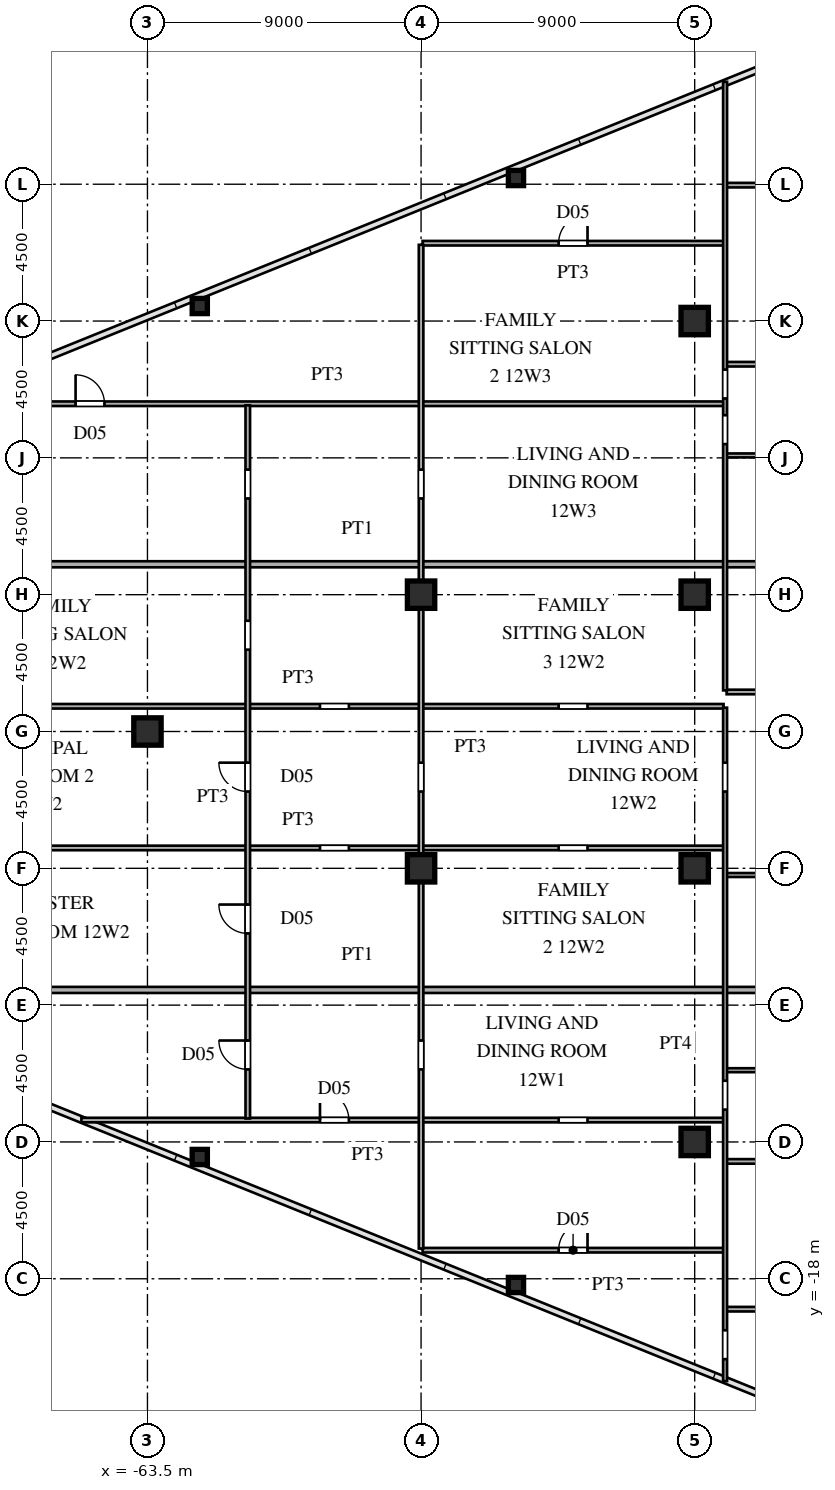
"""IFC4 building model, lengths in metres.
Left out: names, types, materials, properties, quantities, classifications, styles, units other than length and angle.
Written with IfcOpenShell. Run it as: python <this file> out.ifc"""

import sys

from ifc_helpers import new_model, si_unit, direction, frame, frame_2d, origin, origin_2d, place, context, subcontext, project, spatial, rectangle, hollow_rectangle, i_section, extrude, source, transform, mapped, element, fill, save


model = new_model("IFC4")
c1 = context("Model", 3, precision=1e-05, world=origin(), true_north=direction((0.0, 1.0)))
c2 = subcontext(c1, "Body", "Model", "MODEL_VIEW")
j1 = project(units=[si_unit("LENGTHUNIT", "METRE"), si_unit("PLANEANGLEUNIT", "RADIAN")], contexts=[c1])
p1 = place(None, origin())
s1 = spatial("IfcSite", under=j1, at=p1, CompositionType="ELEMENT")
p2 = place(p1, origin())
s2 = spatial("IfcBuilding", under=s1, at=p2, CompositionType="ELEMENT")
p3 = place(p2, frame((0.0, 0.0, 47.7)))
s3 = spatial("IfcBuildingStorey", under=s2, at=p3, CompositionType="ELEMENT", Elevation=47.7)
m1 = source(origin(), c2, "Body", "SweptSolid", [
    extrude(i_section(OverallWidth=0.9, OverallDepth=0.9, WebThickness=0.036, FlangeThickness=0.055, at=origin_2d()), origin(), (0.0, 0.0, 1.0), 3.6),
])
for number, where, z_axis, x_axis in (
    (1, (-45.5, -13.5, 0.0), (0.0, 0.0, 1.0), (1.0, 0.0, 0.0)),
    (2, (-45.5, -4.5, 0.0), (0.0, 0.0, 1.0), (1.0, 0.0, 0.0)),
    (3, (-45.5, 4.5, 0.0), (0.0, 0.0, 1.0), (1.0, 0.0, 0.0)),
    (4, (-45.5, 13.5, 0.0), (0.0, 0.0, 1.0), (1.0, 0.0, 0.0)),
    (5, (-54.5, -4.5, 0.0), (0.0, 0.0, 1.0), (1.0, 0.0, 0.0)),
    (6, (-54.5, 4.5, 0.0), (0.0, 0.0, 1.0), (1.0, 0.0, 0.0)),
    (7, (-63.5, 0.0, 0.0), (0.0, 0.0, 1.0), (1.0, 0.0, 0.0)),
):
    element("IfcColumn", number, at=place(p3, frame(where, z_axis=z_axis, x_axis=x_axis)), inside=s3, PredefinedType="COLUMN", context=c2, shape_type="MappedRepresentation", body=[
        mapped(m1, transform((0.0, 0.0, 0.0), scale=1.0)),
    ])
m2 = source(origin(), c2, "Body", "SweptSolid", [
    extrude(hollow_rectangle(XDim=0.5, YDim=0.5, WallThickness=0.02, at=origin_2d()), origin(), (0.0, 0.0, 1.0), 3.6),
])
for number, where, z_axis, x_axis in (
    (8, (-51.378, -18.204, 0.0), (0.0, 0.0, 1.0), (1.0, 0.0, 0.0)),
    (9, (-61.779, -13.994, 0.0), (0.0, 0.0, 1.0), (1.0, 0.0, 0.0)),
    (10, (-51.378, 18.204, 0.0), (0.0, 0.0, 1.0), (1.0, 0.0, 0.0)),
    (11, (-61.779, 13.994, 0.0), (0.0, 0.0, 1.0), (1.0, 0.0, 0.0)),
):
    element("IfcColumn", number, at=place(p3, frame(where, z_axis=z_axis, x_axis=x_axis)), inside=s3, PredefinedType="COLUMN", context=c2, shape_type="MappedRepresentation", body=[
        mapped(m2, transform((0.0, 0.0, 0.0), scale=1.0)),
    ])
p4 = place(p3, frame((-44.45, -19.0, 0.0), z_axis=(0.0, 0.0, 1.0), x_axis=(1.0, 0.0, 0.0)))
e12 = element("IfcWall", 12, at=p4, inside=s3, PredefinedType="PARTITIONING", context=c2, shape_type="SweptSolid", body=[
    extrude(rectangle(XDim=6.15, YDim=0.15, at=frame_2d((3.075, 0.0))), origin(), (0.0, 0.0, 1.0), 3.38),
])
p5 = place(p3, frame((-54.45, -17.06, 0.0), z_axis=(0.0, 0.0, 1.0), x_axis=(1.0, 0.0, 0.0)))
e13 = element("IfcWall", 13, at=p5, inside=s3, PredefinedType="PARTITIONING", context=c2, shape_type="SweptSolid", body=[
    extrude(rectangle(XDim=9.9, YDim=0.15, at=frame_2d((4.95, 0.0))), origin(), (0.0, 0.0, 1.0), 3.38),
])
p6 = place(p5, frame((4.475, 0.0, 0.0)))
e14 = element("IfcOpeningElement", 14, at=p6, cuts=e13, PredefinedType="OPENING", context=c2, shape_type="SweptSolid", body=[
    extrude(rectangle(XDim=0.95, YDim=2.15, at=frame_2d((0.475, 1.075))), frame((0.0, 0.085, 0.0), z_axis=(0.0, -1.0, 0.0), x_axis=(1.0, 0.0, 0.0)), (0.0, 0.0, 1.0), 0.17),
])
p7 = place(p3, frame((-44.45, -14.14, 0.0), z_axis=(0.0, 0.0, 1.0), x_axis=(1.0, 0.0, 0.0)))
e15 = element("IfcWall", 15, at=p7, inside=s3, PredefinedType="PARTITIONING", context=c2, shape_type="SweptSolid", body=[
    extrude(rectangle(XDim=6.1, YDim=0.15, at=frame_2d((3.05, 0.0))), origin(), (0.0, 0.0, 1.0), 3.38),
])
p8 = place(p7, frame((2.575, 0.0, 0.0)))
e16 = element("IfcOpeningElement", 16, at=p8, cuts=e15, PredefinedType="OPENING", context=c2, shape_type="SweptSolid", body=[
    extrude(rectangle(XDim=0.95, YDim=2.15, at=frame_2d((0.475, 1.075))), frame((0.0, 0.085, 0.0), z_axis=(0.0, -1.0, 0.0), x_axis=(1.0, 0.0, 0.0)), (0.0, 0.0, 1.0), 0.17),
])
p9 = place(p3, frame((-65.672, -12.78, 0.0), z_axis=(0.0, 0.0, 1.0), x_axis=(1.0, 0.0, 0.0)))
e17 = element("IfcWall", 17, at=p9, inside=s3, PredefinedType="PARTITIONING", context=c2, shape_type="SweptSolid", body=[
    extrude(rectangle(XDim=21.122, YDim=0.15, at=frame_2d((10.561, 0.0))), origin(), (0.0, 0.0, 1.0), 3.38),
])
p10 = place(p9, frame((15.697, 0.0, 0.0)))
e18 = element("IfcOpeningElement", 18, at=p10, cuts=e17, PredefinedType="OPENING", context=c2, shape_type="SweptSolid", body=[
    extrude(rectangle(XDim=0.95, YDim=2.15, at=frame_2d((0.475, 1.075))), frame((0.0, 0.085, 0.0), z_axis=(0.0, -1.0, 0.0), x_axis=(1.0, 0.0, 0.0)), (0.0, 0.0, 1.0), 0.17),
])
p11 = place(p9, frame((7.847, 0.0, 0.0)))
e19 = element("IfcOpeningElement", 19, at=p11, cuts=e17, PredefinedType="OPENING", context=c2, shape_type="SweptSolid", body=[
    extrude(rectangle(XDim=0.95, YDim=2.15, at=frame_2d((0.475, 1.075))), frame((0.0, 0.085, 0.0), z_axis=(0.0, -1.0, 0.0), x_axis=(1.0, 0.0, 0.0)), (0.0, 0.0, 1.0), 0.17),
])
p12 = place(p3, frame((-44.45, -11.14, 0.0), z_axis=(0.0, 0.0, 1.0), x_axis=(1.0, 0.0, 0.0)))
e20 = element("IfcWall", 20, at=p12, inside=s3, PredefinedType="PARTITIONING", context=c2, shape_type="SweptSolid", body=[
    extrude(rectangle(XDim=6.1, YDim=0.13, at=frame_2d((3.05, 0.0))), origin(), (0.0, 0.0, 1.0), 3.38),
])
p13 = place(p12, frame((2.61, 0.0, 0.0)))
e21 = element("IfcOpeningElement", 21, at=p13, cuts=e20, PredefinedType="OPENING", context=c2, shape_type="SweptSolid", body=[
    extrude(rectangle(XDim=0.88, YDim=2.1, at=frame_2d((0.44, 1.05))), frame((0.0, 0.075, 0.0), z_axis=(0.0, -1.0, 0.0), x_axis=(1.0, 0.0, 0.0)), (0.0, 0.0, 1.0), 0.15),
])
p14 = place(p3, frame((-72.505, -8.5, 0.0), z_axis=(0.0, 0.0, 1.0), x_axis=(1.0, 0.0, 0.0)))
e22 = element("IfcWall", 22, at=p14, inside=s3, PredefinedType="PARTITIONING", context=c2, shape_type="SweptSolid", body=[
    extrude(rectangle(XDim=34.125, YDim=0.2, at=frame_2d((17.062, 0.0))), origin(), (0.0, 0.0, 1.0), 3.38),
])
p15 = place(p3, frame((-44.45, -4.72, 0.0), z_axis=(0.0, 0.0, 1.0), x_axis=(1.0, 0.0, 0.0)))
e23 = element("IfcWall", 23, at=p15, inside=s3, PredefinedType="PARTITIONING", context=c2, shape_type="SweptSolid", body=[
    extrude(rectangle(XDim=6.1, YDim=0.13, at=frame_2d((3.05, 0.0))), origin(), (0.0, 0.0, 1.0), 3.38),
])
p16 = place(p15, frame((2.61, 0.0, 0.0)))
e24 = element("IfcOpeningElement", 24, at=p16, cuts=e23, PredefinedType="OPENING", context=c2, shape_type="SweptSolid", body=[
    extrude(rectangle(XDim=0.88, YDim=2.1, at=frame_2d((0.44, 1.05))), frame((0.0, 0.075, 0.0), z_axis=(0.0, -1.0, 0.0), x_axis=(1.0, 0.0, 0.0)), (0.0, 0.0, 1.0), 0.15),
])
p17 = place(p3, frame((-72.535, -3.83, 0.0), z_axis=(0.0, 0.0, 1.0), x_axis=(1.0, 0.0, 0.0)))
e25 = element("IfcWall", 25, at=p17, inside=s3, PredefinedType="PARTITIONING", context=c2, shape_type="SweptSolid", body=[
    extrude(rectangle(XDim=27.985, YDim=0.15, at=frame_2d((13.992, 0.0))), origin(), (0.0, 0.0, 1.0), 3.38),
])
p18 = place(p17, frame((22.56, 0.0, 0.0)))
e26 = element("IfcOpeningElement", 26, at=p18, cuts=e25, PredefinedType="OPENING", context=c2, shape_type="SweptSolid", body=[
    extrude(rectangle(XDim=0.95, YDim=2.15, at=frame_2d((0.475, 1.075))), frame((0.0, 0.085, 0.0), z_axis=(0.0, -1.0, 0.0), x_axis=(1.0, 0.0, 0.0)), (0.0, 0.0, 1.0), 0.17),
])
p19 = place(p17, frame((14.71, 0.0, 0.0)))
e27 = element("IfcOpeningElement", 27, at=p19, cuts=e25, PredefinedType="OPENING", context=c2, shape_type="SweptSolid", body=[
    extrude(rectangle(XDim=0.95, YDim=2.15, at=frame_2d((0.475, 1.075))), frame((0.0, 0.085, 0.0), z_axis=(0.0, -1.0, 0.0), x_axis=(1.0, 0.0, 0.0)), (0.0, 0.0, 1.0), 0.17),
])
p20 = place(p3, frame((-72.535, 0.83, 0.0), z_axis=(0.0, 0.0, 1.0), x_axis=(1.0, 0.0, 0.0)))
e28 = element("IfcWall", 28, at=p20, inside=s3, PredefinedType="PARTITIONING", context=c2, shape_type="SweptSolid", body=[
    extrude(rectangle(XDim=27.985, YDim=0.15, at=frame_2d((13.992, 0.0))), origin(), (0.0, 0.0, 1.0), 3.38),
])
p21 = place(p20, frame((22.56, 0.0, 0.0)))
e29 = element("IfcOpeningElement", 29, at=p21, cuts=e28, PredefinedType="OPENING", context=c2, shape_type="SweptSolid", body=[
    extrude(rectangle(XDim=0.95, YDim=2.15, at=frame_2d((0.475, 1.075))), frame((0.0, 0.085, 0.0), z_axis=(0.0, -1.0, 0.0), x_axis=(1.0, 0.0, 0.0)), (0.0, 0.0, 1.0), 0.17),
])
p22 = place(p20, frame((14.71, 0.0, 0.0)))
e30 = element("IfcOpeningElement", 30, at=p22, cuts=e28, PredefinedType="OPENING", context=c2, shape_type="SweptSolid", body=[
    extrude(rectangle(XDim=0.95, YDim=2.15, at=frame_2d((0.475, 1.075))), frame((0.0, 0.085, 0.0), z_axis=(0.0, -1.0, 0.0), x_axis=(1.0, 0.0, 0.0)), (0.0, 0.0, 1.0), 0.17),
])
p23 = place(p3, frame((-44.45, 1.3, 0.0), z_axis=(0.0, 0.0, 1.0), x_axis=(1.0, 0.0, 0.0)))
e31 = element("IfcWall", 31, at=p23, inside=s3, PredefinedType="PARTITIONING", context=c2, shape_type="SweptSolid", body=[
    extrude(rectangle(XDim=6.1, YDim=0.15, at=frame_2d((3.05, 0.0))), origin(), (0.0, 0.0, 1.0), 3.38),
])
p24 = place(p23, frame((2.575, 0.0, 0.0)))
e32 = element("IfcOpeningElement", 32, at=p24, cuts=e31, PredefinedType="OPENING", context=c2, shape_type="SweptSolid", body=[
    extrude(rectangle(XDim=0.95, YDim=2.15, at=frame_2d((0.475, 1.075))), frame((0.0, 0.085, 0.0), z_axis=(0.0, -1.0, 0.0), x_axis=(1.0, 0.0, 0.0)), (0.0, 0.0, 1.0), 0.17),
])
p25 = place(p3, frame((-72.505, 5.5, 0.0), z_axis=(0.0, 0.0, 1.0), x_axis=(1.0, 0.0, 0.0)))
e33 = element("IfcWall", 33, at=p25, inside=s3, PredefinedType="PARTITIONING", context=c2, shape_type="SweptSolid", body=[
    extrude(rectangle(XDim=34.125, YDim=0.2, at=frame_2d((17.062, 0.0))), origin(), (0.0, 0.0, 1.0), 3.38),
])
p26 = place(p3, frame((-44.45, 9.08, 0.0), z_axis=(0.0, 0.0, 1.0), x_axis=(1.0, 0.0, 0.0)))
e34 = element("IfcWall", 34, at=p26, inside=s3, PredefinedType="PARTITIONING", context=c2, shape_type="SweptSolid", body=[
    extrude(rectangle(XDim=6.1, YDim=0.13, at=frame_2d((3.05, 0.0))), origin(), (0.0, 0.0, 1.0), 3.38),
])
p27 = place(p26, frame((2.61, 0.0, 0.0)))
e35 = element("IfcOpeningElement", 35, at=p27, cuts=e34, PredefinedType="OPENING", context=c2, shape_type="SweptSolid", body=[
    extrude(rectangle(XDim=0.88, YDim=2.1, at=frame_2d((0.44, 1.05))), frame((0.0, 0.075, 0.0), z_axis=(0.0, -1.0, 0.0), x_axis=(1.0, 0.0, 0.0)), (0.0, 0.0, 1.0), 0.15),
])
p28 = place(p3, frame((-70.613, 10.78, 0.0), z_axis=(0.0, 0.0, 1.0), x_axis=(1.0, 0.0, 0.0)))
e36 = element("IfcWall", 36, at=p28, inside=s3, PredefinedType="PARTITIONING", context=c2, shape_type="SweptSolid", body=[
    extrude(rectangle(XDim=26.063, YDim=0.15, at=frame_2d((13.031, 0.0))), origin(), (0.0, 0.0, 1.0), 3.38),
])
p29 = place(p28, frame((4.749, 0.0, 0.0)))
e37 = element("IfcOpeningElement", 37, at=p29, cuts=e36, PredefinedType="OPENING", context=c2, shape_type="SweptSolid", body=[
    extrude(rectangle(XDim=0.95, YDim=2.15, at=frame_2d((0.475, 1.075))), frame((0.0, 0.085, 0.0), z_axis=(0.0, -1.0, 0.0), x_axis=(1.0, 0.0, 0.0)), (0.0, 0.0, 1.0), 0.17),
])
p30 = place(p3, frame((-44.45, 12.08, 0.0), z_axis=(0.0, 0.0, 1.0), x_axis=(1.0, 0.0, 0.0)))
e38 = element("IfcWall", 38, at=p30, inside=s3, PredefinedType="PARTITIONING", context=c2, shape_type="SweptSolid", body=[
    extrude(rectangle(XDim=6.1, YDim=0.15, at=frame_2d((3.05, 0.0))), origin(), (0.0, 0.0, 1.0), 3.38),
])
p31 = place(p30, frame((2.575, 0.0, 0.0)))
e39 = element("IfcOpeningElement", 39, at=p31, cuts=e38, PredefinedType="OPENING", context=c2, shape_type="SweptSolid", body=[
    extrude(rectangle(XDim=0.95, YDim=2.15, at=frame_2d((0.475, 1.075))), frame((0.0, 0.085, 0.0), z_axis=(0.0, -1.0, 0.0), x_axis=(1.0, 0.0, 0.0)), (0.0, 0.0, 1.0), 0.17),
])
p32 = place(p3, frame((-54.45, 16.06, 0.0), z_axis=(0.0, 0.0, 1.0), x_axis=(1.0, 0.0, 0.0)))
e40 = element("IfcWall", 40, at=p32, inside=s3, PredefinedType="PARTITIONING", context=c2, shape_type="SweptSolid", body=[
    extrude(rectangle(XDim=9.9, YDim=0.15, at=frame_2d((4.95, 0.0))), origin(), (0.0, 0.0, 1.0), 3.38),
])
p33 = place(p32, frame((4.475, 0.0, 0.0)))
e41 = element("IfcOpeningElement", 41, at=p33, cuts=e40, PredefinedType="OPENING", context=c2, shape_type="SweptSolid", body=[
    extrude(rectangle(XDim=0.95, YDim=2.15, at=frame_2d((0.475, 1.075))), frame((0.0, 0.085, 0.0), z_axis=(0.0, -1.0, 0.0), x_axis=(1.0, 0.0, 0.0)), (0.0, 0.0, 1.0), 0.17),
])
p34 = place(p3, frame((-44.45, 17.97, 0.0), z_axis=(0.0, 0.0, 1.0), x_axis=(1.0, 0.0, 0.0)))
e42 = element("IfcWall", 42, at=p34, inside=s3, PredefinedType="PARTITIONING", context=c2, shape_type="SweptSolid", body=[
    extrude(rectangle(XDim=6.15, YDim=0.15, at=frame_2d((3.075, 0.0))), origin(), (0.0, 0.0, 1.0), 3.38),
])
p35 = place(p3, frame((-60.2, -12.728, 0.0), z_axis=(0.0, 0.0, 1.0), x_axis=(0.0, 1.0, 0.0)))
e43 = element("IfcWall", 43, at=p35, inside=s3, PredefinedType="PARTITIONING", context=c2, shape_type="SweptSolid", body=[
    extrude(rectangle(XDim=23.456, YDim=0.15, at=frame_2d((11.728, 0.0))), origin(), (0.0, 0.0, 1.0), 3.38),
])
p36 = place(p35, frame((1.614, 0.0, 0.0)))
e44 = element("IfcOpeningElement", 44, at=p36, cuts=e43, PredefinedType="OPENING", context=c2, shape_type="SweptSolid", body=[
    extrude(rectangle(XDim=0.95, YDim=2.15, at=frame_2d((0.475, 1.075))), frame((0.0, 0.085, 0.0), z_axis=(0.0, -1.0, 0.0), x_axis=(1.0, 0.0, 0.0)), (0.0, 0.0, 1.0), 0.17),
])
p37 = place(p35, frame((6.086, 0.0, 0.0)))
e45 = element("IfcOpeningElement", 45, at=p37, cuts=e43, PredefinedType="OPENING", context=c2, shape_type="SweptSolid", body=[
    extrude(rectangle(XDim=0.95, YDim=2.15, at=frame_2d((0.475, 1.075))), frame((0.0, 0.085, 0.0), z_axis=(0.0, -1.0, 0.0), x_axis=(1.0, 0.0, 0.0)), (0.0, 0.0, 1.0), 0.17),
])
p38 = place(p35, frame((10.753, 0.0, 0.0)))
e46 = element("IfcOpeningElement", 46, at=p38, cuts=e43, PredefinedType="OPENING", context=c2, shape_type="SweptSolid", body=[
    extrude(rectangle(XDim=0.95, YDim=2.15, at=frame_2d((0.475, 1.075))), frame((0.0, 0.085, 0.0), z_axis=(0.0, -1.0, 0.0), x_axis=(1.0, 0.0, 0.0)), (0.0, 0.0, 1.0), 0.17),
])
p39 = place(p35, frame((15.42, 0.0, 0.0)))
e47 = element("IfcOpeningElement", 47, at=p39, cuts=e43, PredefinedType="OPENING", context=c2, shape_type="SweptSolid", body=[
    extrude(rectangle(XDim=0.95, YDim=2.15, at=frame_2d((0.475, 1.075))), frame((0.0, 0.085, 0.0), z_axis=(0.0, -1.0, 0.0), x_axis=(1.0, 0.0, 0.0)), (0.0, 0.0, 1.0), 0.17),
])
p40 = place(p35, frame((20.392, 0.0, 0.0)))
e48 = element("IfcOpeningElement", 48, at=p40, cuts=e43, PredefinedType="OPENING", context=c2, shape_type="SweptSolid", body=[
    extrude(rectangle(XDim=0.95, YDim=2.15, at=frame_2d((0.475, 1.075))), frame((0.0, 0.085, 0.0), z_axis=(0.0, -1.0, 0.0), x_axis=(1.0, 0.0, 0.0)), (0.0, 0.0, 1.0), 0.17),
])
p41 = place(p3, frame((-54.5, -17.006, 0.0), z_axis=(0.0, 0.0, 1.0), x_axis=(0.0, 1.0, 0.0)))
e49 = element("IfcWall", 49, at=p41, inside=s3, PredefinedType="PARTITIONING", context=c2, shape_type="SweptSolid", body=[
    extrude(rectangle(XDim=33.012, YDim=0.15, at=frame_2d((16.506, 0.0))), origin(), (0.0, 0.0, 1.0), 2.68),
])
p42 = place(p41, frame((5.892, 0.0, 0.0)))
e50 = element("IfcOpeningElement", 50, at=p42, cuts=e49, PredefinedType="OPENING", context=c2, shape_type="SweptSolid", body=[
    extrude(rectangle(XDim=0.95, YDim=2.15, at=frame_2d((0.475, 1.075))), frame((0.0, 0.085, 0.0), z_axis=(0.0, -1.0, 0.0), x_axis=(1.0, 0.0, 0.0)), (0.0, 0.0, 1.0), 0.17),
])
p43 = place(p41, frame((15.031, 0.0, 0.0)))
e51 = element("IfcOpeningElement", 51, at=p43, cuts=e49, PredefinedType="OPENING", context=c2, shape_type="SweptSolid", body=[
    extrude(rectangle(XDim=0.95, YDim=2.15, at=frame_2d((0.475, 1.075))), frame((0.0, 0.085, 0.0), z_axis=(0.0, -1.0, 0.0), x_axis=(1.0, 0.0, 0.0)), (0.0, 0.0, 1.0), 0.17),
])
p44 = place(p41, frame((24.67, 0.0, 0.0)))
e52 = element("IfcOpeningElement", 52, at=p44, cuts=e49, PredefinedType="OPENING", context=c2, shape_type="SweptSolid", body=[
    extrude(rectangle(XDim=0.95, YDim=2.15, at=frame_2d((0.475, 1.075))), frame((0.0, 0.085, 0.0), z_axis=(0.0, -1.0, 0.0), x_axis=(1.0, 0.0, 0.0)), (0.0, 0.0, 1.0), 0.17),
])
p45 = place(p3, frame((-44.5, -21.368, 0.0), z_axis=(0.0, 0.0, 1.0), x_axis=(0.0, 1.0, 0.0)))
e53 = element("IfcWall", 53, at=p45, inside=s3, PredefinedType="PARTITIONING", context=c2, shape_type="SweptSolid", body=[
    extrude(rectangle(XDim=22.151, YDim=0.13, at=frame_2d((11.075, 0.0))), origin(), (0.0, 0.0, 1.0), 3.38),
])
p46 = place(p45, frame((8.932, 0.0, 0.0)))
e54 = element("IfcOpeningElement", 54, at=p46, cuts=e53, PredefinedType="OPENING", context=c2, shape_type="SweptSolid", body=[
    extrude(rectangle(XDim=0.95, YDim=2.15, at=frame_2d((0.475, 1.075))), frame((0.0, 0.075, 0.0), z_axis=(0.0, -1.0, 0.0), x_axis=(1.0, 0.0, 0.0)), (0.0, 0.0, 1.0), 0.15),
])
p47 = place(p45, frame((0.724, 0.0, 0.0)))
e55 = element("IfcOpeningElement", 55, at=p47, cuts=e53, PredefinedType="OPENING", context=c2, shape_type="SweptSolid", body=[
    extrude(rectangle(XDim=0.95, YDim=2.15, at=frame_2d((0.475, 1.075))), frame((0.0, 0.075, 0.0), z_axis=(0.0, -1.0, 0.0), x_axis=(1.0, 0.0, 0.0)), (0.0, 0.0, 1.0), 0.15),
])
p48 = place(p45, frame((19.393, 0.0, 0.0)))
e56 = element("IfcOpeningElement", 56, at=p48, cuts=e53, PredefinedType="OPENING", context=c2, shape_type="SweptSolid", body=[
    extrude(rectangle(XDim=0.95, YDim=2.15, at=frame_2d((0.475, 1.075))), frame((0.0, 0.075, 0.0), z_axis=(0.0, -1.0, 0.0), x_axis=(1.0, 0.0, 0.0)), (0.0, 0.0, 1.0), 0.15),
])
p49 = place(p3, frame((-44.5, 1.352, 0.0), z_axis=(0.0, 0.0, 1.0), x_axis=(0.0, 1.0, 0.0)))
e57 = element("IfcWall", 57, at=p49, inside=s3, PredefinedType="PARTITIONING", context=c2, shape_type="SweptSolid", body=[
    extrude(rectangle(XDim=20.016, YDim=0.13, at=frame_2d((10.008, 0.0))), origin(), (0.0, 0.0, 1.0), 3.38),
])
p50 = place(p49, frame((8.101, 0.0, 0.0)))
e58 = element("IfcOpeningElement", 58, at=p50, cuts=e57, PredefinedType="OPENING", context=c2, shape_type="SweptSolid", body=[
    extrude(rectangle(XDim=0.95, YDim=2.15, at=frame_2d((0.475, 1.075))), frame((0.0, 0.075, 0.0), z_axis=(0.0, -1.0, 0.0), x_axis=(1.0, 0.0, 0.0)), (0.0, 0.0, 1.0), 0.15),
])
p51 = place(p49, frame((9.601, 0.0, 0.0)))
e59 = element("IfcOpeningElement", 59, at=p51, cuts=e57, PredefinedType="OPENING", context=c2, shape_type="SweptSolid", body=[
    extrude(rectangle(XDim=0.95, YDim=2.15, at=frame_2d((0.475, 1.075))), frame((0.0, 0.075, 0.0), z_axis=(0.0, -1.0, 0.0), x_axis=(1.0, 0.0, 0.0)), (0.0, 0.0, 1.0), 0.15),
])
m3 = source(origin(), c2, "Body", "SweptSolid", [
    extrude(rectangle(XDim=0.95, YDim=2.15, at=frame_2d((0.475, 1.075))), frame((0.0, 0.025, 0.0), z_axis=(0.0, -1.0, 0.0), x_axis=(1.0, 0.0, 0.0)), (0.0, 0.0, 1.0), 0.05),
])
p52 = place(p6, origin())
e60 = element("IfcDoor", 60, at=p52, inside=s3, OperationType="SINGLE_SWING_RIGHT", PredefinedType="DOOR", context=c2, shape_type="MappedRepresentation", body=[
    mapped(m3, transform((0.0, 0.0, 0.0), scale=1.0)),
])
fill(e14, e60)
p53 = place(p11, origin())
e61 = element("IfcDoor", 61, at=p53, inside=s3, OperationType="SINGLE_SWING_LEFT", PredefinedType="DOOR", context=c2, shape_type="MappedRepresentation", body=[
    mapped(m3, transform((0.0, 0.0, 0.0), scale=1.0)),
])
fill(e19, e61)
p54 = place(p29, origin())
e62 = element("IfcDoor", 62, at=p54, inside=s3, OperationType="SINGLE_SWING_LEFT", PredefinedType="DOOR", context=c2, shape_type="MappedRepresentation", body=[
    mapped(m3, transform((0.0, 0.0, 0.0), scale=1.0)),
])
fill(e37, e62)
p55 = place(p33, origin())
e63 = element("IfcDoor", 63, at=p55, inside=s3, OperationType="SINGLE_SWING_RIGHT", PredefinedType="DOOR", context=c2, shape_type="MappedRepresentation", body=[
    mapped(m3, transform((0.0, 0.0, 0.0), scale=1.0)),
])
fill(e41, e63)
p56 = place(p36, origin())
e64 = element("IfcDoor", 64, at=p56, inside=s3, OperationType="SINGLE_SWING_RIGHT", PredefinedType="DOOR", context=c2, shape_type="MappedRepresentation", body=[
    mapped(m3, transform((0.0, 0.0, 0.0), scale=1.0)),
])
fill(e44, e64)
p57 = place(p37, origin())
e65 = element("IfcDoor", 65, at=p57, inside=s3, OperationType="SINGLE_SWING_RIGHT", PredefinedType="DOOR", context=c2, shape_type="MappedRepresentation", body=[
    mapped(m3, transform((0.0, 0.0, 0.0), scale=1.0)),
])
fill(e45, e65)
p58 = place(p38, origin())
e66 = element("IfcDoor", 66, at=p58, inside=s3, OperationType="SINGLE_SWING_RIGHT", PredefinedType="DOOR", context=c2, shape_type="MappedRepresentation", body=[
    mapped(m3, transform((0.0, 0.0, 0.0), scale=1.0)),
])
fill(e46, e66)
save(model, sys.argv[1])
